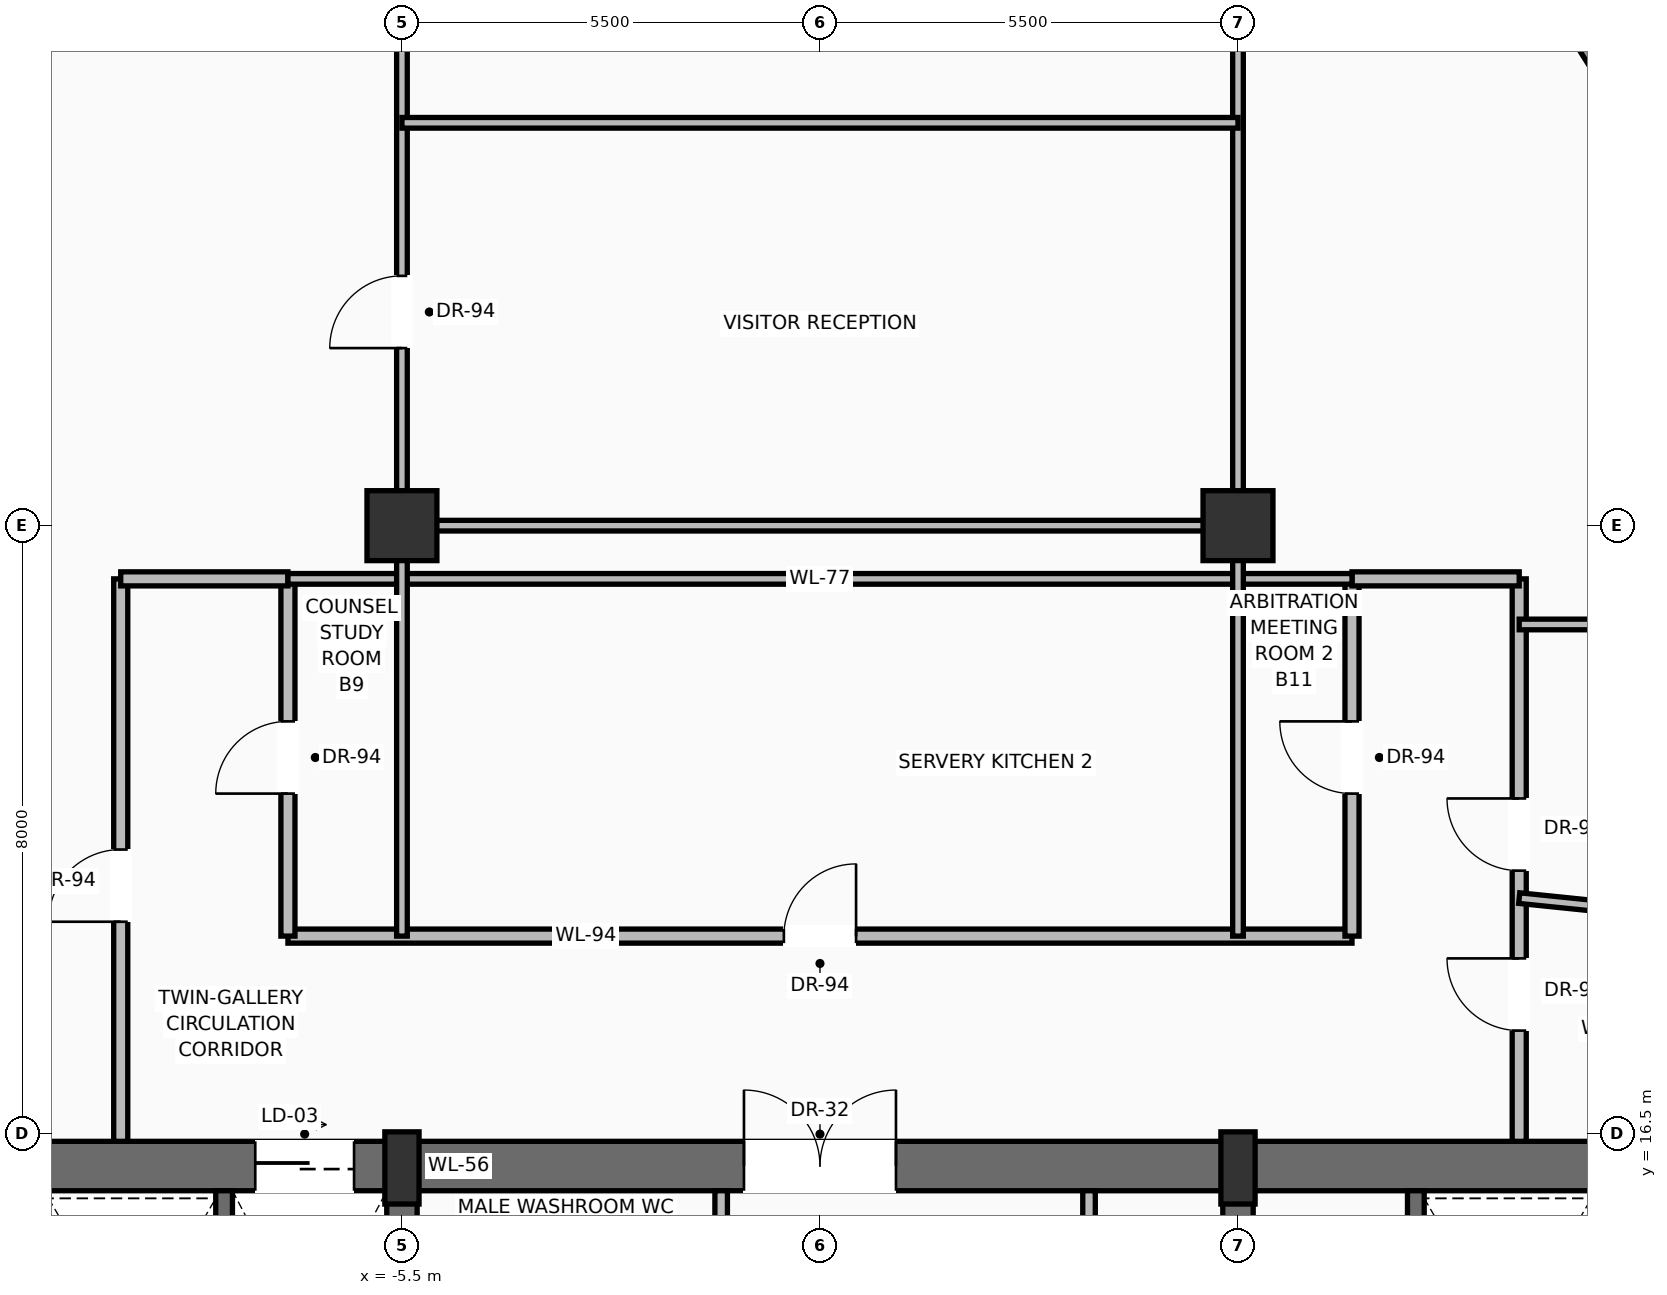
"""IFC4 building model, lengths in metres.
Left out: names, types, materials, properties, quantities, classifications, styles, units other than length and angle.
Written with IfcOpenShell. Run it as: python <this file> out.ifc"""

import sys

from ifc_helpers import new_model, si_unit, direction, frame, frame_2d, origin, origin_2d, place, context, subcontext, project, spatial, rectangle, extrude, source, transform, mapped, element, fill, save


model = new_model("IFC4")
c1 = context("Model", 3, precision=1e-05, world=origin(), true_north=direction((0.0, 1.0)))
c2 = subcontext(c1, "Body", "Model", "MODEL_VIEW")
j1 = project(units=[si_unit("LENGTHUNIT", "METRE"), si_unit("PLANEANGLEUNIT", "RADIAN")], contexts=[c1])
p1 = place(None, origin())
s1 = spatial("IfcSite", under=j1, at=p1, CompositionType="ELEMENT")
p2 = place(p1, origin())
s2 = spatial("IfcBuilding", under=s1, at=p2, CompositionType="ELEMENT")
p3 = place(p2, frame((0.0, 0.0, 211.7)))
s3 = spatial("IfcBuildingStorey", under=s2, at=p3, CompositionType="ELEMENT", Elevation=211.7)
p4 = place(p3, frame((-10.8, 16.075, 0.0), z_axis=(0.0, 0.0, 1.0), x_axis=(1.0, 0.0, 0.0)))
e1 = element("IfcWall", 1, at=p4, inside=s3, PredefinedType="SHEAR", context=c2, shape_type="SweptSolid", body=[
    extrude(rectangle(XDim=21.6, YDim=0.65, at=frame_2d((10.8, 0.0))), origin(), (0.0, 0.0, 1.0), 3.42),
])
p5 = place(p4, frame((3.37, 0.0, 0.0)))
e2 = element("IfcOpeningElement", 2, at=p5, cuts=e1, PredefinedType="OPENING", context=c2, shape_type="SweptSolid", body=[
    extrude(rectangle(XDim=1.3, YDim=2.3, at=frame_2d((0.65, 1.15))), frame((0.0, 0.335, 0.0), z_axis=(0.0, -1.0, 0.0), x_axis=(1.0, 0.0, 0.0)), (0.0, 0.0, 1.0), 0.67),
])
p6 = place(p4, frame((9.8, 0.0, 0.0)))
e3 = element("IfcOpeningElement", 3, at=p6, cuts=e1, PredefinedType="OPENING", context=c2, shape_type="SweptSolid", body=[
    extrude(rectangle(XDim=2.0, YDim=2.4, at=frame_2d((1.0, 1.2))), frame((0.0, 0.335, 0.0), z_axis=(0.0, -1.0, 0.0), x_axis=(1.0, 0.0, 0.0)), (0.0, 0.0, 1.0), 0.67),
])
p7 = place(p3, frame((-5.5, 0.525, 0.0), z_axis=(0.0, 0.0, 1.0), x_axis=(0.0, 1.0, 0.0)))
e4 = element("IfcWall", 4, at=p7, inside=s3, PredefinedType="SHEAR", context=c2, shape_type="SweptSolid", body=[
    extrude(rectangle(XDim=15.55, YDim=0.4, at=frame_2d((7.775, 0.0))), origin(), (0.0, 0.0, 1.0), 3.42),
])
p8 = place(p7, frame((8.975, 0.0, 0.0)))
e5 = element("IfcOpeningElement", 5, at=p8, cuts=e4, PredefinedType="OPENING", context=c2, shape_type="SweptSolid", body=[
    extrude(rectangle(XDim=1.1, YDim=2.2, at=frame_2d((0.55, 1.1))), frame((0.0, 0.21, 0.0), z_axis=(0.0, -1.0, 0.0), x_axis=(1.0, 0.0, 0.0)), (0.0, 0.0, 1.0), 0.42),
])
p9 = place(p3, frame((5.5, 0.525, 0.0), z_axis=(0.0, 0.0, 1.0), x_axis=(0.0, 1.0, 0.0)))
e6 = element("IfcWall", 6, at=p9, inside=s3, PredefinedType="SHEAR", context=c2, shape_type="SweptSolid", body=[
    extrude(rectangle(XDim=15.55, YDim=0.4, at=frame_2d((7.775, 0.0))), origin(), (0.0, 0.0, 1.0), 3.42),
])
p10 = place(p9, frame((8.975, 0.0, 0.0)))
e7 = element("IfcOpeningElement", 7, at=p10, cuts=e6, PredefinedType="OPENING", context=c2, shape_type="SweptSolid", body=[
    extrude(rectangle(XDim=1.1, YDim=2.2, at=frame_2d((0.55, 1.1))), frame((0.0, 0.21, 0.0), z_axis=(0.0, -1.0, 0.0), x_axis=(1.0, 0.0, 0.0)), (0.0, 0.0, 1.0), 0.42),
])
m1 = source(origin(), c2, "Body", "SweptSolid", [
    extrude(rectangle(XDim=0.45, YDim=0.95, at=origin_2d()), origin(), (0.0, 0.0, 1.0), 3.7),
])
for number, where, z_axis, x_axis in (
    (8, (-5.5, 16.05, 0.0), (0.0, 0.0, 1.0), (1.0, 0.0, 0.0)),
    (9, (5.5, 16.05, 0.0), (0.0, 0.0, 1.0), (1.0, 0.0, 0.0)),
):
    element("IfcColumn", number, at=place(p3, frame(where, z_axis=z_axis, x_axis=x_axis)), inside=s3, PredefinedType="PILASTER", context=c2, shape_type="MappedRepresentation", body=[
        mapped(m1, transform((0.0, 0.0, 0.0), scale=1.0)),
    ])
m2 = source(origin(), c2, "Body", "SweptSolid", [
    extrude(rectangle(XDim=0.92, YDim=0.92, at=origin_2d()), origin(), (0.0, 0.0, 1.0), 3.7),
])
for number, where, z_axis, x_axis in (
    (10, (-5.5, 24.5, 0.0), (0.0, 0.0, 1.0), (1.0, 0.0, 0.0)),
    (11, (5.5, 24.5, 0.0), (0.0, 0.0, 1.0), (1.0, 0.0, 0.0)),
):
    element("IfcColumn", number, at=place(p3, frame(where, z_axis=z_axis, x_axis=x_axis)), inside=s3, PredefinedType="COLUMN", context=c2, shape_type="MappedRepresentation", body=[
        mapped(m2, transform((0.0, 0.0, 0.0), scale=1.0)),
    ])
p11 = place(p3, frame((-19.976, 15.744, 0.0), z_axis=(0.0, 0.0, 1.0), x_axis=(0.517464575924, 0.855704629334, 0.0)))
e12 = element("IfcWall", 12, at=p11, inside=s3, PredefinedType="SOLIDWALL", context=c2, shape_type="SweptSolid", body=[
    extrude(rectangle(XDim=19.208, YDim=0.28, at=frame_2d((9.604, 0.0))), origin(), (0.0, 0.0, 1.0), 3.0),
])
p12 = place(p11, frame((4.61, 0.0, 0.0)))
e13 = element("IfcOpeningElement", 13, at=p12, cuts=e12, PredefinedType="OPENING", context=c2, shape_type="SweptSolid", body=[
    extrude(rectangle(XDim=1.6, YDim=2.35, at=frame_2d((0.8, 1.175))), frame((0.0, 0.15, 0.0), z_axis=(0.0, -1.0, 0.0), x_axis=(1.0, 0.0, 0.0)), (0.0, 0.0, 1.0), 0.3),
])
p13 = place(p11, frame((13.062, 0.0, 0.9)))
e14 = element("IfcOpeningElement", 14, at=p13, cuts=e12, PredefinedType="OPENING", context=c2, shape_type="SweptSolid", body=[
    extrude(rectangle(XDim=2.0, YDim=1.85, at=frame_2d((1.0, 0.925))), frame((0.0, 0.15, 0.0), z_axis=(0.0, -1.0, 0.0), x_axis=(1.0, 0.0, 0.0)), (0.0, 0.0, 1.0), 0.3),
])
p14 = place(p3, frame((9.208, 32.265, 0.0), z_axis=(0.0, 0.0, 1.0), x_axis=(0.532287601055, -0.84656358873, 0.0)))
e15 = element("IfcWall", 15, at=p14, inside=s3, PredefinedType="SOLIDWALL", context=c2, shape_type="SweptSolid", body=[
    extrude(rectangle(XDim=19.257, YDim=0.28, at=frame_2d((9.628, 0.0))), origin(), (0.0, 0.0, 1.0), 3.0),
])
p15 = place(p14, frame((4.622, 0.0, 0.0)))
e16 = element("IfcOpeningElement", 16, at=p15, cuts=e15, PredefinedType="OPENING", context=c2, shape_type="SweptSolid", body=[
    extrude(rectangle(XDim=1.6, YDim=2.35, at=frame_2d((0.8, 1.175))), frame((0.0, 0.15, 0.0), z_axis=(0.0, -1.0, 0.0), x_axis=(1.0, 0.0, 0.0)), (0.0, 0.0, 1.0), 0.3),
])
p16 = place(p14, frame((13.095, 0.0, 0.9)))
e17 = element("IfcOpeningElement", 17, at=p16, cuts=e15, PredefinedType="OPENING", context=c2, shape_type="SweptSolid", body=[
    extrude(rectangle(XDim=2.0, YDim=1.85, at=frame_2d((1.0, 0.925))), frame((0.0, 0.15, 0.0), z_axis=(0.0, -1.0, 0.0), x_axis=(1.0, 0.0, 0.0)), (0.0, 0.0, 1.0), 0.3),
])
for number, where, z_axis, x_axis in (
    (18, (-7.84, 11.87, 0.0), (0.0, 0.0, 1.0), (0.0, 1.0, 0.0)),
    (19, (7.84, 11.87, 0.0), (0.0, 0.0, 1.0), (0.0, 1.0, 0.0)),
):
    element("IfcWall", number, at=place(p3, frame(where, z_axis=z_axis, x_axis=x_axis)), inside=s3, PredefinedType="SOLIDWALL", context=c2, shape_type="SweptSolid", body=[
        extrude(rectangle(XDim=3.88, YDim=0.22, at=frame_2d((1.94, 0.0))), origin(), (0.0, 0.0, 1.0), 3.42),
    ])
p17 = place(p3, frame((-1.3, 13.6, 0.0), z_axis=(0.0, 0.0, 1.0), x_axis=(0.0, 1.0, 0.0)))
e20 = element("IfcWall", 20, at=p17, inside=s3, PredefinedType="PARTITIONING", context=c2, shape_type="SweptSolid", body=[
    extrude(rectangle(XDim=2.15, YDim=0.165, at=frame_2d((1.075, 0.0))), origin(), (0.0, 0.0, 1.0), 3.412),
])
p18 = place(p17, frame((0.55, 0.0, 0.0)))
e21 = element("IfcOpeningElement", 21, at=p18, cuts=e20, PredefinedType="OPENING", context=c2, shape_type="SweptSolid", body=[
    extrude(rectangle(XDim=0.9, YDim=2.1, at=frame_2d((0.45, 1.05))), frame((0.0, 0.093, 0.0), z_axis=(0.0, -1.0, 0.0), x_axis=(1.0, 0.0, 0.0)), (0.0, 0.0, 1.0), 0.185),
])
p19 = place(p3, frame((3.54, 11.22, 0.0), z_axis=(0.0, 0.0, 1.0), x_axis=(0.0, 1.0, 0.0)))
e22 = element("IfcWall", 22, at=p19, inside=s3, PredefinedType="PARTITIONING", context=c2, shape_type="SweptSolid", body=[
    extrude(rectangle(XDim=4.53, YDim=0.165, at=frame_2d((2.265, 0.0))), origin(), (0.0, 0.0, 1.0), 3.412),
])
p20 = place(p19, frame((1.25, 0.0, 0.0)))
e23 = element("IfcOpeningElement", 23, at=p20, cuts=e22, PredefinedType="OPENING", context=c2, shape_type="SweptSolid", body=[
    extrude(rectangle(XDim=0.9, YDim=2.1, at=frame_2d((0.45, 1.05))), frame((0.0, 0.093, 0.0), z_axis=(0.0, -1.0, 0.0), x_axis=(1.0, 0.0, 0.0)), (0.0, 0.0, 1.0), 0.185),
])
p21 = place(p3, frame((-7.0, 19.1, 0.0), z_axis=(0.0, 0.0, 1.0), x_axis=(1.0, 0.0, 0.0)))
e24 = element("IfcWall", 24, at=p21, inside=s3, PredefinedType="PARTITIONING", context=c2, shape_type="SweptSolid", body=[
    extrude(rectangle(XDim=14.0, YDim=0.185, at=frame_2d((7.0, 0.0))), origin(), (0.0, 0.0, 1.0), 2.796),
])
p22 = place(p21, frame((6.525, 0.0, 0.0)))
e25 = element("IfcOpeningElement", 25, at=p22, cuts=e24, PredefinedType="OPENING", context=c2, shape_type="SweptSolid", body=[
    extrude(rectangle(XDim=0.95, YDim=2.2, at=frame_2d((0.475, 1.1))), frame((0.0, 0.103, 0.0), z_axis=(0.0, -1.0, 0.0), x_axis=(1.0, 0.0, 0.0)), (0.0, 0.0, 1.0), 0.205),
])
p23 = place(p3, frame((-7.0, 19.1, 0.0), z_axis=(0.0, 0.0, 1.0), x_axis=(0.0, 1.0, 0.0)))
e26 = element("IfcWall", 26, at=p23, inside=s3, PredefinedType="PARTITIONING", context=c2, shape_type="SweptSolid", body=[
    extrude(rectangle(XDim=4.7, YDim=0.185, at=frame_2d((2.35, 0.0))), origin(), (0.0, 0.0, 1.0), 3.412),
])
p24 = place(p23, frame((1.875, 0.0, 0.0)))
e27 = element("IfcOpeningElement", 27, at=p24, cuts=e26, PredefinedType="OPENING", context=c2, shape_type="SweptSolid", body=[
    extrude(rectangle(XDim=0.95, YDim=2.2, at=frame_2d((0.475, 1.1))), frame((0.0, 0.103, 0.0), z_axis=(0.0, -1.0, 0.0), x_axis=(1.0, 0.0, 0.0)), (0.0, 0.0, 1.0), 0.205),
])
p25 = place(p3, frame((7.0, 19.1, 0.0), z_axis=(0.0, 0.0, 1.0), x_axis=(0.0, 1.0, 0.0)))
e28 = element("IfcWall", 28, at=p25, inside=s3, PredefinedType="PARTITIONING", context=c2, shape_type="SweptSolid", body=[
    extrude(rectangle(XDim=4.7, YDim=0.185, at=frame_2d((2.35, 0.0))), origin(), (0.0, 0.0, 1.0), 3.412),
])
p26 = place(p25, frame((1.875, 0.0, 0.0)))
e29 = element("IfcOpeningElement", 29, at=p26, cuts=e28, PredefinedType="OPENING", context=c2, shape_type="SweptSolid", body=[
    extrude(rectangle(XDim=0.95, YDim=2.2, at=frame_2d((0.475, 1.1))), frame((0.0, 0.103, 0.0), z_axis=(0.0, -1.0, 0.0), x_axis=(1.0, 0.0, 0.0)), (0.0, 0.0, 1.0), 0.205),
])
p27 = place(p3, frame((-9.2, 16.4, 0.0), z_axis=(0.0, 0.0, 1.0), x_axis=(0.0, 1.0, 0.0)))
e30 = element("IfcWall", 30, at=p27, inside=s3, PredefinedType="PARTITIONING", context=c2, shape_type="SweptSolid", body=[
    extrude(rectangle(XDim=7.4, YDim=0.185, at=frame_2d((3.7, 0.0))), origin(), (0.0, 0.0, 1.0), 3.412),
])
p28 = place(p27, frame((2.889, 0.0, 0.0)))
e31 = element("IfcOpeningElement", 31, at=p28, cuts=e30, PredefinedType="OPENING", context=c2, shape_type="SweptSolid", body=[
    extrude(rectangle(XDim=0.95, YDim=2.2, at=frame_2d((0.475, 1.1))), frame((0.0, 0.103, 0.0), z_axis=(0.0, -1.0, 0.0), x_axis=(1.0, 0.0, 0.0)), (0.0, 0.0, 1.0), 0.205),
])
p29 = place(p3, frame((9.2, 16.4, 0.0), z_axis=(0.0, 0.0, 1.0), x_axis=(0.0, 1.0, 0.0)))
e32 = element("IfcWall", 32, at=p29, inside=s3, PredefinedType="PARTITIONING", context=c2, shape_type="SweptSolid", body=[
    extrude(rectangle(XDim=7.4, YDim=0.185, at=frame_2d((3.7, 0.0))), origin(), (0.0, 0.0, 1.0), 3.412),
])
p30 = place(p29, frame((3.561, 0.0, 0.0)))
e33 = element("IfcOpeningElement", 33, at=p30, cuts=e32, PredefinedType="OPENING", context=c2, shape_type="SweptSolid", body=[
    extrude(rectangle(XDim=0.95, YDim=2.2, at=frame_2d((0.475, 1.1))), frame((0.0, 0.103, 0.0), z_axis=(0.0, -1.0, 0.0), x_axis=(1.0, 0.0, 0.0)), (0.0, 0.0, 1.0), 0.205),
])
p31 = place(p29, frame((1.457, 0.0, 0.0)))
e34 = element("IfcOpeningElement", 34, at=p31, cuts=e32, PredefinedType="OPENING", context=c2, shape_type="SweptSolid", body=[
    extrude(rectangle(XDim=0.95, YDim=2.2, at=frame_2d((0.475, 1.1))), frame((0.0, 0.103, 0.0), z_axis=(0.0, -1.0, 0.0), x_axis=(1.0, 0.0, 0.0)), (0.0, 0.0, 1.0), 0.205),
])
for number, where, z_axis, x_axis in (
    (35, (-9.2, 23.8, 0.0), (0.0, 0.0, 1.0), (1.0, 0.0, 0.0)),
    (36, (7.0, 23.8, 0.0), (0.0, 0.0, 1.0), (1.0, 0.0, 0.0)),
):
    element("IfcWall", number, at=place(p3, frame(where, z_axis=z_axis, x_axis=x_axis)), inside=s3, PredefinedType="PARTITIONING", context=c2, shape_type="SweptSolid", body=[
        extrude(rectangle(XDim=2.2, YDim=0.185, at=frame_2d((1.1, 0.0))), origin(), (0.0, 0.0, 1.0), 3.412),
    ])
p32 = place(p3, frame((-7.0, 23.8, 0.0), z_axis=(0.0, 0.0, 1.0), x_axis=(1.0, 0.0, 0.0)))
e37 = element("IfcWall", 37, at=p32, inside=s3, PredefinedType="PARTITIONING", context=c2, shape_type="SweptSolid", body=[
    extrude(rectangle(XDim=14.0, YDim=0.14, at=frame_2d((7.0, 0.0))), origin(), (0.0, 0.0, 1.0), 3.412),
])
p33 = place(p3, frame((-5.5, 19.1, 0.0), z_axis=(0.0, 0.0, 1.0), x_axis=(0.0, 1.0, 0.0)))
e38 = element("IfcWall", 38, at=p33, inside=s3, PredefinedType="PARTITIONING", context=c2, shape_type="SweptSolid", body=[
    extrude(rectangle(XDim=13.4, YDim=0.14, at=frame_2d((6.7, 0.0))), origin(), (0.0, 0.0, 1.0), 2.796),
])
p34 = place(p33, frame((7.736, 0.0, 0.0)))
e39 = element("IfcOpeningElement", 39, at=p34, cuts=e38, PredefinedType="OPENING", context=c2, shape_type="SweptSolid", body=[
    extrude(rectangle(XDim=0.95, YDim=2.2, at=frame_2d((0.475, 1.1))), frame((0.0, 0.08, 0.0), z_axis=(0.0, -1.0, 0.0), x_axis=(1.0, 0.0, 0.0)), (0.0, 0.0, 1.0), 0.16),
])
p35 = place(p3, frame((5.5, 19.1, 0.0), z_axis=(0.0, 0.0, 1.0), x_axis=(0.0, 1.0, 0.0)))
e40 = element("IfcWall", 40, at=p35, inside=s3, PredefinedType="PARTITIONING", context=c2, shape_type="SweptSolid", body=[
    extrude(rectangle(XDim=13.4, YDim=0.14, at=frame_2d((6.7, 0.0))), origin(), (0.0, 0.0, 1.0), 2.796),
])
p36 = place(p3, frame((-5.5, 24.5, 0.0), z_axis=(0.0, 0.0, 1.0), x_axis=(1.0, 0.0, 0.0)))
e41 = element("IfcWall", 41, at=p36, inside=s3, PredefinedType="PARTITIONING", context=c2, shape_type="SweptSolid", body=[
    extrude(rectangle(XDim=11.0, YDim=0.14, at=frame_2d((5.5, 0.0))), origin(), (0.0, 0.0, 1.0), 2.796),
])
p37 = place(p3, frame((-5.5, 29.8, 0.0), z_axis=(0.0, 0.0, 1.0), x_axis=(1.0, 0.0, 0.0)))
e42 = element("IfcWall", 42, at=p37, inside=s3, PredefinedType="PARTITIONING", context=c2, shape_type="SweptSolid", body=[
    extrude(rectangle(XDim=11.0, YDim=0.14, at=frame_2d((5.5, 0.0))), origin(), (0.0, 0.0, 1.0), 3.412),
])
p38 = place(p3, frame((9.2, 19.6, 0.0), z_axis=(0.0, 0.0, 1.0), x_axis=(0.994778090634, -0.102061503002, 0.0)))
e43 = element("IfcWall", 43, at=p38, inside=s3, PredefinedType="PARTITIONING", context=c2, shape_type="SweptSolid", body=[
    extrude(rectangle(XDim=8.731, YDim=0.14, at=frame_2d((4.366, 0.0))), origin(), (0.0, 0.0, 1.0), 2.999),
])
p39 = place(p3, frame((9.2, 23.2, 0.0), z_axis=(0.0, 0.0, 1.0), x_axis=(1.0, 0.0, 0.0)))
e44 = element("IfcWall", 44, at=p39, inside=s3, PredefinedType="PARTITIONING", context=c2, shape_type="SweptSolid", body=[
    extrude(rectangle(XDim=5.862, YDim=0.14, at=frame_2d((2.931, 0.0))), origin(), (0.0, 0.0, 1.0), 3.412),
])
m3 = source(origin(), c2, "Body", "SweptSolid", [
    extrude(rectangle(XDim=1.3, YDim=2.3, at=frame_2d((0.65, 1.15))), frame((0.0, 0.025, 0.0), z_axis=(0.0, -1.0, 0.0), x_axis=(1.0, 0.0, 0.0)), (0.0, 0.0, 1.0), 0.05),
])
p40 = place(p5, origin())
e45 = element("IfcDoor", 45, at=p40, inside=s3, OperationType="SLIDING_TO_RIGHT", PredefinedType="DOOR", context=c2, shape_type="MappedRepresentation", body=[
    mapped(m3, transform((0.0, 0.0, 0.0), scale=1.0)),
])
fill(e2, e45)
m4 = source(origin(), c2, "Body", "SweptSolid", [
    extrude(rectangle(XDim=2.0, YDim=2.4, at=frame_2d((1.0, 1.2))), frame((0.0, 0.025, 0.0), z_axis=(0.0, -1.0, 0.0), x_axis=(1.0, 0.0, 0.0)), (0.0, 0.0, 1.0), 0.05),
])
p41 = place(p6, origin())
e46 = element("IfcDoor", 46, at=p41, inside=s3, OperationType="DOUBLE_DOOR_SINGLE_SWING", PredefinedType="DOOR", context=c2, shape_type="MappedRepresentation", body=[
    mapped(m4, transform((0.0, 0.0, 0.0), scale=1.0)),
])
fill(e3, e46)
m5 = source(origin(), c2, "Body", "SweptSolid", [
    extrude(rectangle(XDim=0.95, YDim=2.2, at=frame_2d((0.475, 1.1))), frame((0.0, 0.025, 0.0), z_axis=(0.0, -1.0, 0.0), x_axis=(1.0, 0.0, 0.0)), (0.0, 0.0, 1.0), 0.05),
])
p42 = place(p22, origin())
e47 = element("IfcDoor", 47, at=p42, inside=s3, OperationType="SINGLE_SWING_RIGHT", PredefinedType="DOOR", context=c2, shape_type="MappedRepresentation", body=[
    mapped(m5, transform((0.0, 0.0, 0.0), scale=1.0)),
])
fill(e25, e47)
p43 = place(p28, origin())
e48 = element("IfcDoor", 48, at=p43, inside=s3, OperationType="SINGLE_SWING_LEFT", PredefinedType="DOOR", context=c2, shape_type="MappedRepresentation", body=[
    mapped(m5, transform((0.0, 0.0, 0.0), scale=1.0)),
])
fill(e31, e48)
p44 = place(p30, origin())
e49 = element("IfcDoor", 49, at=p44, inside=s3, OperationType="SINGLE_SWING_RIGHT", PredefinedType="DOOR", context=c2, shape_type="MappedRepresentation", body=[
    mapped(m5, transform((0.0, 0.0, 0.0), scale=1.0)),
])
fill(e33, e49)
p45 = place(p31, origin())
e50 = element("IfcDoor", 50, at=p45, inside=s3, OperationType="SINGLE_SWING_RIGHT", PredefinedType="DOOR", context=c2, shape_type="MappedRepresentation", body=[
    mapped(m5, transform((0.0, 0.0, 0.0), scale=1.0)),
])
fill(e34, e50)
p46 = place(p24, origin())
e51 = element("IfcDoor", 51, at=p46, inside=s3, OperationType="SINGLE_SWING_LEFT", PredefinedType="DOOR", context=c2, shape_type="MappedRepresentation", body=[
    mapped(m5, transform((0.0, 0.0, 0.0), scale=1.0)),
])
fill(e27, e51)
p47 = place(p26, origin())
e52 = element("IfcDoor", 52, at=p47, inside=s3, OperationType="SINGLE_SWING_RIGHT", PredefinedType="DOOR", context=c2, shape_type="MappedRepresentation", body=[
    mapped(m5, transform((0.0, 0.0, 0.0), scale=1.0)),
])
fill(e29, e52)
p48 = place(p34, origin())
e53 = element("IfcDoor", 53, at=p48, inside=s3, OperationType="SINGLE_SWING_LEFT", PredefinedType="DOOR", context=c2, shape_type="MappedRepresentation", body=[
    mapped(m5, transform((0.0, 0.0, 0.0), scale=1.0)),
])
fill(e39, e53)
save(model, sys.argv[1])
